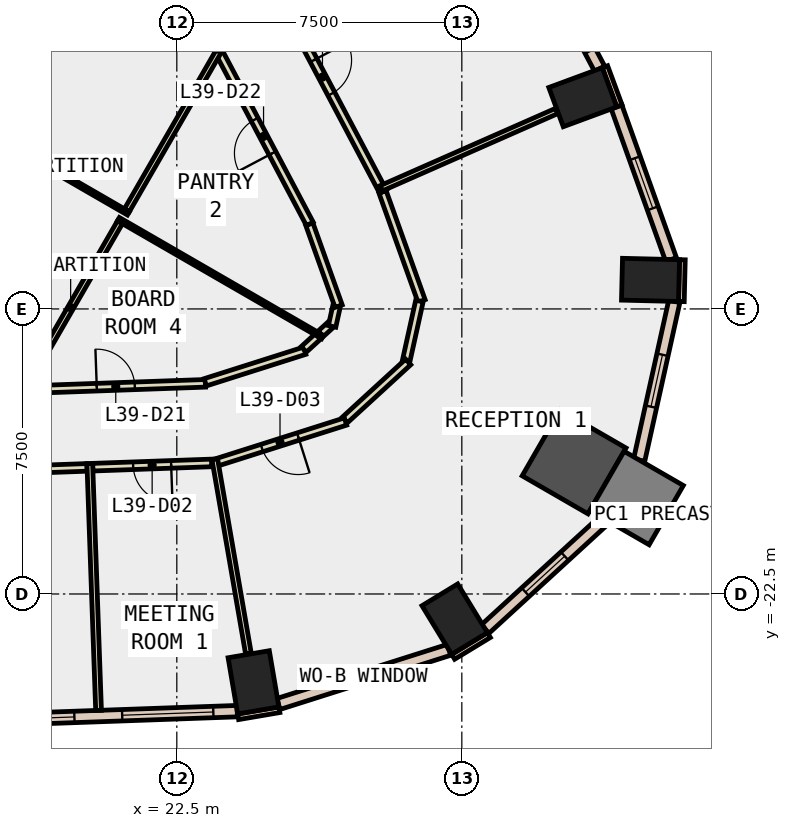
"""IFC4 building model, lengths in metres.
Left out: names, types, materials, properties, quantities, classifications, styles, units other than length and angle.
Written with IfcOpenShell. Run it as: python <this file> out.ifc"""

import sys

from ifc_helpers import new_model, si_unit, direction, frame, frame_2d, origin, origin_2d, place, context, subcontext, project, spatial, rectangle, extrude, element, fill, save


model = new_model("IFC4")
c1 = context("Model", 3, precision=1e-05, world=origin(), true_north=direction((0.0, 1.0)))
c2 = subcontext(c1, "Body", "Model", "MODEL_VIEW")
j1 = project(units=[si_unit("LENGTHUNIT", "METRE"), si_unit("PLANEANGLEUNIT", "RADIAN")], contexts=[c1])
p1 = place(None, origin())
s1 = spatial("IfcSite", under=j1, at=p1, CompositionType="ELEMENT")
p2 = place(p1, origin())
s2 = spatial("IfcBuilding", under=s1, at=p2, CompositionType="ELEMENT")
p3 = place(p2, frame((0.0, 0.0, 176.0)))
s3 = spatial("IfcBuildingStorey", under=s2, at=p3, CompositionType="ELEMENT", Elevation=176.0)
for number, where, z_axis, x_axis in (
    (1, (24.518, -24.825, -0.4), (0.0, 0.0, 1.0), (0.986, 0.168, 0.0)),
    (2, (29.812, -23.163, -0.4), (0.0, 0.0, 1.0), (0.854, 0.521, 0.0)),
):
    element("IfcColumn", number, at=place(p3, frame(where, z_axis=z_axis, x_axis=x_axis)), inside=s3, PredefinedType="COLUMN", context=c2, shape_type="SweptSolid", body=[
        extrude(rectangle(XDim=1.1, YDim=1.5, at=origin_2d()), origin(), (0.0, 0.0, 1.0), 4.2),
    ])
p4 = place(p3, frame((32.954, -19.025, -0.4), z_axis=(0.0, 0.0, 1.0), x_axis=(-0.866025403784, 0.5, 0.0)))
e3 = element("IfcColumn", 3, at=p4, inside=s3, PredefinedType="COLUMN", context=c2, shape_type="SweptSolid", body=[
    extrude(rectangle(XDim=2.0, YDim=2.0, at=origin_2d()), origin(), (0.0, 0.0, 1.0), 4.2),
])
for number, where, z_axis, x_axis in (
    (4, (34.965, -14.236, -0.4), (0.0, 0.0, 1.0), (0.024, 1.0, 0.0)),
    (5, (33.183, -9.429, -0.4), (0.0, 0.0, 1.0), (-0.347, 0.938, 0.0)),
):
    element("IfcColumn", number, at=place(p3, frame(where, z_axis=z_axis, x_axis=x_axis)), inside=s3, PredefinedType="COLUMN", context=c2, shape_type="SweptSolid", body=[
        extrude(rectangle(XDim=1.1, YDim=1.5, at=origin_2d()), origin(), (0.0, 0.0, 1.0), 4.2),
    ])
p5 = place(p3, frame((34.599, -19.975, -0.4), z_axis=(0.0, 0.0, 1.0), x_axis=(-0.866025403784, 0.5, 0.0)))
e6 = element("IfcColumn", 6, at=p5, inside=s3, PredefinedType="COLUMN", context=c2, shape_type="SweptSolid", body=[
    extrude(rectangle(XDim=1.8, YDim=1.8, at=origin_2d()), origin(), (0.0, 0.0, 1.0), 4.2),
])
p6 = place(p3, frame((34.147, -9.659, 0.0), z_axis=(0.0, 0.0, 1.0), x_axis=(-0.346229846278, 0.938149718087, 0.0)))
e7 = element("IfcWall", 7, at=p6, inside=s3, PredefinedType="STANDARD", context=c2, shape_type="SweptSolid", body=[
    extrude(rectangle(XDim=1.1, YDim=0.15, at=frame_2d((0.55, 0.0))), origin(), (0.0, 0.0, 1.0), 3.8),
])
p7 = place(p3, frame((24.114, -25.731, 0.0), z_axis=(0.0, 0.0, 1.0), x_axis=(0.985763338892, 0.168138751323, 0.0)))
e8 = element("IfcWall", 8, at=p7, inside=s3, PredefinedType="STANDARD", context=c2, shape_type="SweptSolid", body=[
    extrude(rectangle(XDim=1.101, YDim=0.15, at=frame_2d((0.55, 0.0))), origin(), (0.0, 0.0, 1.0), 3.8),
])
p8 = place(p3, frame((29.772, -24.153, 0.0), z_axis=(0.0, 0.0, 1.0), x_axis=(0.854005542721, 0.520263907071, 0.0)))
e9 = element("IfcWall", 9, at=p8, inside=s3, PredefinedType="STANDARD", context=c2, shape_type="SweptSolid", body=[
    extrude(rectangle(XDim=1.099, YDim=0.15, at=frame_2d((0.55, 0.0))), origin(), (0.0, 0.0, 1.0), 3.8),
])
p9 = place(p3, frame((35.777, -14.806, 0.0), z_axis=(0.0, 0.0, 1.0), x_axis=(0.023522901136, 0.999723298279, 0.0)))
e10 = element("IfcWall", 10, at=p9, inside=s3, PredefinedType="STANDARD", context=c2, shape_type="SweptSolid", body=[
    extrude(rectangle(XDim=1.1, YDim=0.15, at=frame_2d((0.55, 0.0))), origin(), (0.0, 0.0, 1.0), 3.8),
])
p10 = place(p3, frame((16.778, -25.843, 0.0), z_axis=(0.0, 0.0, 1.0), x_axis=(0.999368368263, 0.035536805082, 0.0)))
e11 = element("IfcWall", 11, at=p10, inside=s3, PredefinedType="STANDARD", context=c2, shape_type="SweptSolid", body=[
    extrude(rectangle(XDim=7.317, YDim=0.3, at=frame_2d((3.658, 0.0))), origin(), (0.0, 0.0, 1.0), 3.8),
])
p11 = place(p10, frame((0.629, 0.0, 0.9)))
e12 = element("IfcOpeningElement", 12, at=p11, cuts=e11, PredefinedType="OPENING", context=c2, shape_type="SweptSolid", body=[
    extrude(rectangle(XDim=2.4, YDim=2.6, at=frame_2d((1.2, 1.3))), frame((0.0, 0.16, 0.0), z_axis=(0.0, -1.0, 0.0), x_axis=(1.0, 0.0, 0.0)), (0.0, 0.0, 1.0), 0.32),
])
p12 = place(p10, frame((4.287, 0.0, 0.9)))
e13 = element("IfcOpeningElement", 13, at=p12, cuts=e11, PredefinedType="OPENING", context=c2, shape_type="SweptSolid", body=[
    extrude(rectangle(XDim=2.4, YDim=2.6, at=frame_2d((1.2, 1.3))), frame((0.0, 0.16, 0.0), z_axis=(0.0, -1.0, 0.0), x_axis=(1.0, 0.0, 0.0)), (0.0, 0.0, 1.0), 0.32),
])
p13 = place(p3, frame((25.172, -25.395, 0.0), z_axis=(0.0, 0.0, 1.0), x_axis=(0.953145379857, 0.302512619337, 0.0)))
e14 = element("IfcWall", 14, at=p13, inside=s3, PredefinedType="STANDARD", context=c2, shape_type="SweptSolid", body=[
    extrude(rectangle(XDim=4.711, YDim=0.3, at=frame_2d((2.355, 0.0))), origin(), (0.0, 0.0, 1.0), 3.8),
])
p14 = place(p13, frame((1.655, 0.0, 0.9)))
e15 = element("IfcOpeningElement", 15, at=p14, cuts=e14, PredefinedType="OPENING", context=c2, shape_type="SweptSolid", body=[
    extrude(rectangle(XDim=1.4, YDim=2.6, at=frame_2d((0.7, 1.3))), frame((0.0, 0.16, 0.0), z_axis=(0.0, -1.0, 0.0), x_axis=(1.0, 0.0, 0.0)), (0.0, 0.0, 1.0), 0.32),
])
p15 = place(p3, frame((30.614, -23.423, 0.0), z_axis=(0.0, 0.0, 1.0), x_axis=(0.737279680174, 0.675587650274, 0.0)))
e16 = element("IfcWall", 16, at=p15, inside=s3, PredefinedType="STANDARD", context=c2, shape_type="SweptSolid", body=[
    extrude(rectangle(XDim=4.278, YDim=0.3, at=frame_2d((2.139, 0.0))), origin(), (0.0, 0.0, 1.0), 3.8),
])
p16 = place(p15, frame((1.439, 0.0, 0.9)))
e17 = element("IfcOpeningElement", 17, at=p16, cuts=e16, PredefinedType="OPENING", context=c2, shape_type="SweptSolid", body=[
    extrude(rectangle(XDim=1.4, YDim=2.6, at=frame_2d((0.7, 1.3))), frame((0.0, 0.16, 0.0), z_axis=(0.0, -1.0, 0.0), x_axis=(1.0, 0.0, 0.0)), (0.0, 0.0, 1.0), 0.32),
])
p17 = place(p3, frame((34.667, -18.976, 0.0), z_axis=(0.0, 0.0, 1.0), x_axis=(0.216102175589, 0.976370754225, 0.0)))
e18 = element("IfcWall", 18, at=p17, inside=s3, PredefinedType="STANDARD", context=c2, shape_type="SweptSolid", body=[
    extrude(rectangle(XDim=4.276, YDim=0.3, at=frame_2d((2.138, 0.0))), origin(), (0.0, 0.0, 1.0), 3.8),
])
p18 = place(p17, frame((1.438, 0.0, 0.9)))
e19 = element("IfcOpeningElement", 19, at=p18, cuts=e18, PredefinedType="OPENING", context=c2, shape_type="SweptSolid", body=[
    extrude(rectangle(XDim=1.4, YDim=2.6, at=frame_2d((0.7, 1.3))), frame((0.0, 0.16, 0.0), z_axis=(0.0, -1.0, 0.0), x_axis=(1.0, 0.0, 0.0)), (0.0, 0.0, 1.0), 0.32),
])
p19 = place(p3, frame((35.506, -13.7, 0.0), z_axis=(0.0, 0.0, 1.0), x_axis=(-0.336652028742, 0.941629126325, 0.0)))
e20 = element("IfcWall", 20, at=p19, inside=s3, PredefinedType="STANDARD", context=c2, shape_type="SweptSolid", body=[
    extrude(rectangle(XDim=4.263, YDim=0.3, at=frame_2d((2.131, 0.0))), origin(), (0.0, 0.0, 1.0), 3.8),
])
p20 = place(p19, frame((1.431, 0.0, 0.9)))
e21 = element("IfcOpeningElement", 21, at=p20, cuts=e20, PredefinedType="OPENING", context=c2, shape_type="SweptSolid", body=[
    extrude(rectangle(XDim=1.4, YDim=2.6, at=frame_2d((0.7, 1.3))), frame((0.0, 0.16, 0.0), z_axis=(0.0, -1.0, 0.0), x_axis=(1.0, 0.0, 0.0)), (0.0, 0.0, 1.0), 0.32),
])
p21 = place(p3, frame((33.626, -8.68, 0.0), z_axis=(0.0, 0.0, 1.0), x_axis=(-0.467572383403, 0.883954787463, 0.0)))
e22 = element("IfcWall", 22, at=p21, inside=s3, PredefinedType="STANDARD", context=c2, shape_type="SweptSolid", body=[
    extrude(rectangle(XDim=6.119, YDim=0.3, at=frame_2d((3.06, 0.0))), origin(), (0.0, 0.0, 1.0), 3.8),
])
p22 = place(p21, frame((0.53, 0.0, 0.9)))
e23 = element("IfcOpeningElement", 23, at=p22, cuts=e22, PredefinedType="OPENING", context=c2, shape_type="SweptSolid", body=[
    extrude(rectangle(XDim=2.0, YDim=2.6, at=frame_2d((1.0, 1.3))), frame((0.0, 0.16, 0.0), z_axis=(0.0, -1.0, 0.0), x_axis=(1.0, 0.0, 0.0)), (0.0, 0.0, 1.0), 0.32),
])
p23 = place(p21, frame((3.589, 0.0, 0.9)))
e24 = element("IfcOpeningElement", 24, at=p23, cuts=e22, PredefinedType="OPENING", context=c2, shape_type="SweptSolid", body=[
    extrude(rectangle(XDim=2.0, YDim=2.6, at=frame_2d((1.0, 1.3))), frame((0.0, 0.16, 0.0), z_axis=(0.0, -1.0, 0.0), x_axis=(1.0, 0.0, 0.0)), (0.0, 0.0, 1.0), 0.32),
])
p24 = place(p3, frame((18.534, -17.125, 0.0), z_axis=(0.0, 0.0, 1.0), x_axis=(0.999367128298, 0.035571658351, 0.0)))
e25 = element("IfcWall", 25, at=p24, inside=s3, PredefinedType="PARTITIONING", context=c2, shape_type="SweptSolid", body=[
    extrude(rectangle(XDim=4.722, YDim=0.2, at=frame_2d((2.361, 0.0))), origin(), (0.0, 0.0, 1.0), 3.75),
])
p25 = place(p24, frame((1.861, 0.0, 0.0)))
e26 = element("IfcOpeningElement", 26, at=p25, cuts=e25, PredefinedType="OPENING", context=c2, shape_type="SweptSolid", body=[
    extrude(rectangle(XDim=1.0, YDim=2.1, at=frame_2d((0.5, 1.05))), frame((0.0, 0.11, 0.0), z_axis=(0.0, -1.0, 0.0), x_axis=(1.0, 0.0, 0.0)), (0.0, 0.0, 1.0), 0.22),
])
p26 = place(p3, frame((23.249, -16.93, 0.0), z_axis=(0.0, 0.0, 1.0), x_axis=(0.953158072423, 0.302472625167, 0.0)))
e27 = element("IfcWall", 27, at=p26, inside=s3, PredefinedType="PARTITIONING", context=c2, shape_type="SweptSolid", body=[
    extrude(rectangle(XDim=2.743, YDim=0.2, at=frame_2d((1.372, 0.0))), origin(), (0.0, 0.0, 1.0), 3.75),
])
p27 = place(p3, frame((25.842, -16.063, 0.0), z_axis=(0.0, 0.0, 1.0), x_axis=(0.738222400631, 0.674557400972, 0.0)))
e28 = element("IfcWall", 28, at=p27, inside=s3, PredefinedType="PARTITIONING", context=c2, shape_type="SweptSolid", body=[
    extrude(rectangle(XDim=0.502, YDim=0.2, at=frame_2d((0.251, 0.0))), origin(), (0.0, 0.0, 1.0), 3.75),
])
p28 = place(p3, frame((26.286, -15.656, 0.0), z_axis=(0.0, 0.0, 1.0), x_axis=(0.73763613927, 0.675198434568, 0.0)))
e29 = element("IfcWall", 29, at=p28, inside=s3, PredefinedType="PARTITIONING", context=c2, shape_type="SweptSolid", body=[
    extrude(rectangle(XDim=0.336, YDim=0.2, at=frame_2d((0.168, 0.0))), origin(), (0.0, 0.0, 1.0), 3.75),
])
p29 = place(p3, frame((26.586, -15.459, 0.0), z_axis=(0.0, 0.0, 1.0), x_axis=(0.215832999607, 0.976430292586, 0.0)))
e30 = element("IfcWall", 30, at=p29, inside=s3, PredefinedType="PARTITIONING", context=c2, shape_type="SweptSolid", body=[
    extrude(rectangle(XDim=0.542, YDim=0.2, at=frame_2d((0.271, 0.0))), origin(), (0.0, 0.0, 1.0), 3.75),
])
p30 = place(p3, frame((26.758, -14.926, 0.0), z_axis=(0.0, 0.0, 1.0), x_axis=(-0.33645112914, 0.941700927949, 0.0)))
e31 = element("IfcWall", 31, at=p30, inside=s3, PredefinedType="PARTITIONING", context=c2, shape_type="SweptSolid", body=[
    extrude(rectangle(XDim=2.292, YDim=0.2, at=frame_2d((1.146, 0.0))), origin(), (0.0, 0.0, 1.0), 3.75),
])
p31 = place(p3, frame((26.0, -12.762, 0.0), z_axis=(0.0, 0.0, 1.0), x_axis=(-0.467534471159, 0.883974840297, 0.0)))
e32 = element("IfcWall", 32, at=p31, inside=s3, PredefinedType="PARTITIONING", context=c2, shape_type="SweptSolid", body=[
    extrude(rectangle(XDim=5.208, YDim=0.2, at=frame_2d((2.604, 0.0))), origin(), (0.0, 0.0, 1.0), 3.75),
])
p32 = place(p31, frame((2.104, 0.0, 0.0)))
e33 = element("IfcOpeningElement", 33, at=p32, cuts=e32, PredefinedType="OPENING", context=c2, shape_type="SweptSolid", body=[
    extrude(rectangle(XDim=1.0, YDim=2.1, at=frame_2d((0.5, 1.05))), frame((0.0, 0.11, 0.0), z_axis=(0.0, -1.0, 0.0), x_axis=(1.0, 0.0, 0.0)), (0.0, 0.0, 1.0), 0.22),
])
p33 = place(p3, frame((20.138, -19.169, 0.0), z_axis=(0.0, 0.0, 1.0), x_axis=(-0.999355925453, -0.035885014442, 0.0)))
e34 = element("IfcWall", 34, at=p33, inside=s3, PredefinedType="PARTITIONING", context=c2, shape_type="SweptSolid", body=[
    extrude(rectangle(XDim=4.096, YDim=0.2, at=frame_2d((2.048, 0.0))), origin(), (0.0, 0.0, 1.0), 3.75),
])
p34 = place(p3, frame((23.415, -19.052, 0.0), z_axis=(0.0, 0.0, 1.0), x_axis=(-0.999358473407, -0.035813986516, 0.0)))
e35 = element("IfcWall", 35, at=p34, inside=s3, PredefinedType="PARTITIONING", context=c2, shape_type="SweptSolid", body=[
    extrude(rectangle(XDim=3.129, YDim=0.2, at=frame_2d((1.564, 0.0))), origin(), (0.0, 0.0, 1.0), 3.75),
])
p35 = place(p34, frame((1.065, 0.0, 0.0)))
e36 = element("IfcOpeningElement", 36, at=p35, cuts=e35, PredefinedType="OPENING", context=c2, shape_type="SweptSolid", body=[
    extrude(rectangle(XDim=1.0, YDim=2.1, at=frame_2d((0.5, 1.05))), frame((0.0, 0.11, 0.0), z_axis=(0.0, -1.0, 0.0), x_axis=(1.0, 0.0, 0.0)), (0.0, 0.0, 1.0), 0.22),
])
p36 = place(p3, frame((27.913, -11.919, 0.0), z_axis=(0.0, 0.0, 1.0), x_axis=(0.336864004528, -0.941553313654, 0.0)))
e37 = element("IfcWall", 37, at=p36, inside=s3, PredefinedType="PARTITIONING", context=c2, shape_type="SweptSolid", body=[
    extrude(rectangle(XDim=3.048, YDim=0.2, at=frame_2d((1.524, 0.0))), origin(), (0.0, 0.0, 1.0), 3.75),
])
p37 = place(p3, frame((28.884, -14.793, 0.0), z_axis=(0.0, 0.0, 1.0), x_axis=(-0.216223984898, -0.976343785946, 0.0)))
e38 = element("IfcWall", 38, at=p37, inside=s3, PredefinedType="PARTITIONING", context=c2, shape_type="SweptSolid", body=[
    extrude(rectangle(XDim=1.61, YDim=0.2, at=frame_2d((0.805, 0.0))), origin(), (0.0, 0.0, 1.0), 3.75),
])
p38 = place(p3, frame((28.588, -16.395, 0.0), z_axis=(0.0, 0.0, 1.0), x_axis=(-0.737118331834, -0.675763690112, 0.0)))
e39 = element("IfcWall", 39, at=p38, inside=s3, PredefinedType="PARTITIONING", context=c2, shape_type="SweptSolid", body=[
    extrude(rectangle(XDim=2.264, YDim=0.2, at=frame_2d((1.132, 0.0))), origin(), (0.0, 0.0, 1.0), 3.75),
])
p39 = place(p3, frame((26.94, -17.962, 0.0), z_axis=(0.0, 0.0, 1.0), x_axis=(-0.953197442309, -0.302348533941, 0.0)))
e40 = element("IfcWall", 40, at=p39, inside=s3, PredefinedType="PARTITIONING", context=c2, shape_type="SweptSolid", body=[
    extrude(rectangle(XDim=3.618, YDim=0.2, at=frame_2d((1.809, 0.0))), origin(), (0.0, 0.0, 1.0), 3.75),
])
p40 = place(p39, frame((1.309, 0.0, 0.0)))
e41 = element("IfcOpeningElement", 41, at=p40, cuts=e40, PredefinedType="OPENING", context=c2, shape_type="SweptSolid", body=[
    extrude(rectangle(XDim=1.0, YDim=2.1, at=frame_2d((0.5, 1.05))), frame((0.0, 0.11, 0.0), z_axis=(0.0, -1.0, 0.0), x_axis=(1.0, 0.0, 0.0)), (0.0, 0.0, 1.0), 0.22),
])
p41 = place(p3, frame((24.738, -5.885, 0.0), z_axis=(0.0, 0.0, 1.0), x_axis=(0.467616297571, -0.883931557444, 0.0)))
e42 = element("IfcWall", 42, at=p41, inside=s3, PredefinedType="PARTITIONING", context=c2, shape_type="SweptSolid", body=[
    extrude(rectangle(XDim=6.82, YDim=0.2, at=frame_2d((3.41, 0.0))), origin(), (0.0, 0.0, 1.0), 3.75),
])
p42 = place(p41, frame((2.91, 0.0, 0.0)))
e43 = element("IfcOpeningElement", 43, at=p42, cuts=e42, PredefinedType="OPENING", context=c2, shape_type="SweptSolid", body=[
    extrude(rectangle(XDim=1.0, YDim=2.1, at=frame_2d((0.5, 1.05))), frame((0.0, 0.11, 0.0), z_axis=(0.0, -1.0, 0.0), x_axis=(1.0, 0.0, 0.0)), (0.0, 0.0, 1.0), 0.22),
])
p43 = place(p3, frame((17.004, -10.047, 0.0), z_axis=(0.0, 0.0, 1.0), x_axis=(0.865997117979, -0.500048989253, 0.0)))
e44 = element("IfcWall", 44, at=p43, inside=s3, PredefinedType="PARTITIONING", context=c2, shape_type="SweptSolid", body=[
    extrude(rectangle(XDim=4.875, YDim=0.1, at=frame_2d((2.438, 0.0))), origin(), (0.0, 0.0, 1.0), 3.75),
])
p44 = place(p3, frame((21.004, -12.719, 0.0), z_axis=(0.0, 0.0, 1.0), x_axis=(-0.499877157623, -0.866096315249, 0.0)))
e45 = element("IfcWall", 45, at=p44, inside=s3, PredefinedType="PARTITIONING", context=c2, shape_type="SweptSolid", body=[
    extrude(rectangle(XDim=5.191, YDim=0.15, at=frame_2d((2.596, 0.0))), origin(), (0.0, 0.0, 1.0), 3.75),
])
p45 = place(p3, frame((23.6, -8.224, 0.0), z_axis=(0.0, 0.0, 1.0), x_axis=(-0.500120854176, -0.865955617349, 0.0)))
e46 = element("IfcWall", 46, at=p45, inside=s3, PredefinedType="PARTITIONING", context=c2, shape_type="SweptSolid", body=[
    extrude(rectangle(XDim=4.827, YDim=0.15, at=frame_2d((2.414, 0.0))), origin(), (0.0, 0.0, 1.0), 3.75),
])
p46 = place(p3, frame((20.964, -12.638, 0.0), z_axis=(0.0, 0.0, 1.0), x_axis=(0.865981737723, -0.500075624211, 0.0)))
e47 = element("IfcWall", 47, at=p46, inside=s3, PredefinedType="PARTITIONING", context=c2, shape_type="SweptSolid", body=[
    extrude(rectangle(XDim=6.203, YDim=0.1, at=frame_2d((3.102, 0.0))), origin(), (0.0, 0.0, 1.0), 3.75),
])
p47 = place(p3, frame((20.21, -19.067, 0.0), z_axis=(0.0, 0.0, 1.0), x_axis=(0.035530768169, -0.999368582913, 0.0)))
e48 = element("IfcWall", 48, at=p47, inside=s3, PredefinedType="PARTITIONING", context=c2, shape_type="SweptSolid", body=[
    extrude(rectangle(XDim=6.5, YDim=0.15, at=frame_2d((3.25, 0.0))), origin(), (0.0, 0.0, 1.0), 3.75),
])
p48 = place(p3, frame((23.498, -18.95, 0.0), z_axis=(0.0, 0.0, 1.0), x_axis=(0.170609023531, -0.985338805229, 0.0)))
e49 = element("IfcWall", 49, at=p48, inside=s3, PredefinedType="PARTITIONING", context=c2, shape_type="SweptSolid", body=[
    extrude(rectangle(XDim=5.193, YDim=0.15, at=frame_2d((2.597, 0.0))), origin(), (0.0, 0.0, 1.0), 3.75),
])
p49 = place(p3, frame((27.88, -11.825, 0.0), z_axis=(0.0, 0.0, 1.0), x_axis=(0.915110098234, 0.403204052696, 0.0)))
e50 = element("IfcWall", 50, at=p49, inside=s3, PredefinedType="PARTITIONING", context=c2, shape_type="SweptSolid", body=[
    extrude(rectangle(XDim=5.044, YDim=0.15, at=frame_2d((2.522, 0.0))), origin(), (0.0, 0.0, 1.0), 3.75),
])
p50 = place(p11, origin())
e51 = element("IfcWindow", 51, at=p50, inside=s3, PartitioningType="SINGLE_PANEL", PredefinedType="WINDOW", context=c2, shape_type="SweptSolid", body=[
    extrude(rectangle(XDim=2.4, YDim=2.6, at=frame_2d((1.2, 1.3))), frame((0.0, 0.03, 0.0), z_axis=(0.0, -1.0, 0.0), x_axis=(1.0, 0.0, 0.0)), (0.0, 0.0, 1.0), 0.06),
])
fill(e12, e51)
p51 = place(p12, origin())
e52 = element("IfcWindow", 52, at=p51, inside=s3, PartitioningType="SINGLE_PANEL", PredefinedType="WINDOW", context=c2, shape_type="SweptSolid", body=[
    extrude(rectangle(XDim=2.4, YDim=2.6, at=frame_2d((1.2, 1.3))), frame((0.0, 0.03, 0.0), z_axis=(0.0, -1.0, 0.0), x_axis=(1.0, 0.0, 0.0)), (0.0, 0.0, 1.0), 0.06),
])
fill(e13, e52)
p52 = place(p14, origin())
e53 = element("IfcWindow", 53, at=p52, inside=s3, PartitioningType="SINGLE_PANEL", PredefinedType="WINDOW", context=c2, shape_type="SweptSolid", body=[
    extrude(rectangle(XDim=1.4, YDim=2.6, at=frame_2d((0.7, 1.3))), frame((0.0, 0.03, 0.0), z_axis=(0.0, -1.0, 0.0), x_axis=(1.0, 0.0, 0.0)), (0.0, 0.0, 1.0), 0.06),
])
fill(e15, e53)
p53 = place(p16, origin())
e54 = element("IfcWindow", 54, at=p53, inside=s3, PartitioningType="SINGLE_PANEL", PredefinedType="WINDOW", context=c2, shape_type="SweptSolid", body=[
    extrude(rectangle(XDim=1.4, YDim=2.6, at=frame_2d((0.7, 1.3))), frame((0.0, 0.03, 0.0), z_axis=(0.0, -1.0, 0.0), x_axis=(1.0, 0.0, 0.0)), (0.0, 0.0, 1.0), 0.06),
])
fill(e17, e54)
p54 = place(p18, origin())
e55 = element("IfcWindow", 55, at=p54, inside=s3, PartitioningType="SINGLE_PANEL", PredefinedType="WINDOW", context=c2, shape_type="SweptSolid", body=[
    extrude(rectangle(XDim=1.4, YDim=2.6, at=frame_2d((0.7, 1.3))), frame((0.0, 0.03, 0.0), z_axis=(0.0, -1.0, 0.0), x_axis=(1.0, 0.0, 0.0)), (0.0, 0.0, 1.0), 0.06),
])
fill(e19, e55)
p55 = place(p20, origin())
e56 = element("IfcWindow", 56, at=p55, inside=s3, PartitioningType="SINGLE_PANEL", PredefinedType="WINDOW", context=c2, shape_type="SweptSolid", body=[
    extrude(rectangle(XDim=1.4, YDim=2.6, at=frame_2d((0.7, 1.3))), frame((0.0, 0.03, 0.0), z_axis=(0.0, -1.0, 0.0), x_axis=(1.0, 0.0, 0.0)), (0.0, 0.0, 1.0), 0.06),
])
fill(e21, e56)
p56 = place(p35, origin())
e57 = element("IfcDoor", 57, at=p56, inside=s3, OperationType="SINGLE_SWING_LEFT", PredefinedType="DOOR", context=c2, shape_type="SweptSolid", body=[
    extrude(rectangle(XDim=1.0, YDim=2.1, at=frame_2d((0.5, 1.05))), frame((0.0, 0.025, 0.0), z_axis=(0.0, -1.0, 0.0), x_axis=(1.0, 0.0, 0.0)), (0.0, 0.0, 1.0), 0.05),
])
fill(e36, e57)
p57 = place(p40, origin())
e58 = element("IfcDoor", 58, at=p57, inside=s3, OperationType="SINGLE_SWING_LEFT", PredefinedType="DOOR", context=c2, shape_type="SweptSolid", body=[
    extrude(rectangle(XDim=1.0, YDim=2.1, at=frame_2d((0.5, 1.05))), frame((0.0, 0.025, 0.0), z_axis=(0.0, -1.0, 0.0), x_axis=(1.0, 0.0, 0.0)), (0.0, 0.0, 1.0), 0.05),
])
fill(e41, e58)
p58 = place(p42, origin())
e59 = element("IfcDoor", 59, at=p58, inside=s3, OperationType="SINGLE_SWING_LEFT", PredefinedType="DOOR", context=c2, shape_type="SweptSolid", body=[
    extrude(rectangle(XDim=1.0, YDim=2.1, at=frame_2d((0.5, 1.05))), frame((0.0, 0.025, 0.0), z_axis=(0.0, -1.0, 0.0), x_axis=(1.0, 0.0, 0.0)), (0.0, 0.0, 1.0), 0.05),
])
fill(e43, e59)
p59 = place(p25, origin())
e60 = element("IfcDoor", 60, at=p59, inside=s3, OperationType="SINGLE_SWING_LEFT", PredefinedType="DOOR", context=c2, shape_type="SweptSolid", body=[
    extrude(rectangle(XDim=1.0, YDim=2.1, at=frame_2d((0.5, 1.05))), frame((0.0, 0.025, 0.0), z_axis=(0.0, -1.0, 0.0), x_axis=(1.0, 0.0, 0.0)), (0.0, 0.0, 1.0), 0.05),
])
fill(e26, e60)
p60 = place(p32, origin())
e61 = element("IfcDoor", 61, at=p60, inside=s3, OperationType="SINGLE_SWING_LEFT", PredefinedType="DOOR", context=c2, shape_type="SweptSolid", body=[
    extrude(rectangle(XDim=1.0, YDim=2.1, at=frame_2d((0.5, 1.05))), frame((0.0, 0.025, 0.0), z_axis=(0.0, -1.0, 0.0), x_axis=(1.0, 0.0, 0.0)), (0.0, 0.0, 1.0), 0.05),
])
fill(e33, e61)
save(model, sys.argv[1])
